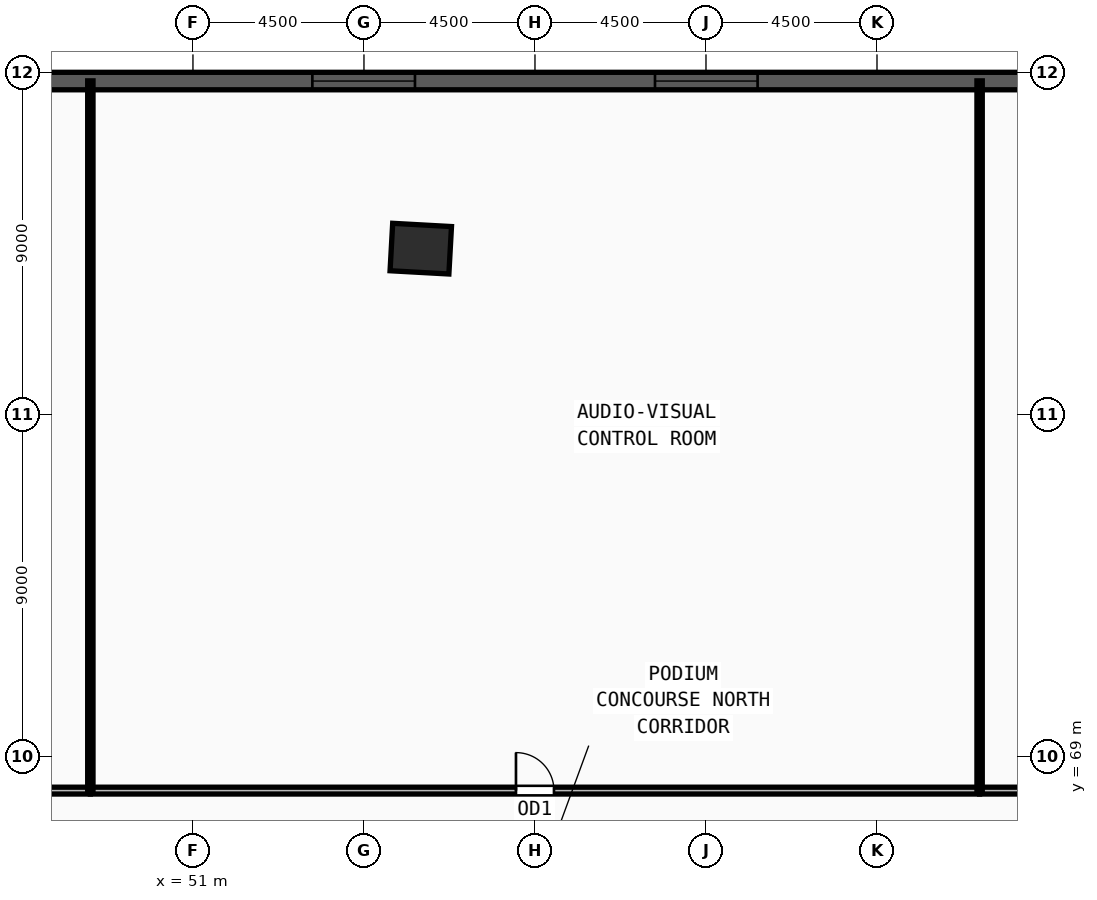
"""IFC4 building model, lengths in metres.
Left out: names, types, materials, properties, quantities, classifications, styles, units other than length and angle.
Written with IfcOpenShell. Run it as: python <this file> out.ifc"""

import sys

from ifc_helpers import new_model, si_unit, direction, frame, frame_2d, origin, origin_2d, place, context, subcontext, project, spatial, rectangle, extrude, source, transform, mapped, element, fill, save


model = new_model("IFC4")
c1 = context("Model", 3, precision=1e-05, world=origin(), true_north=direction((0.0, 1.0)))
c2 = subcontext(c1, "Body", "Model", "MODEL_VIEW")
j1 = project(units=[si_unit("LENGTHUNIT", "METRE"), si_unit("PLANEANGLEUNIT", "RADIAN")], contexts=[c1])
p1 = place(None, origin())
s1 = spatial("IfcSite", under=j1, at=p1, CompositionType="ELEMENT")
p2 = place(p1, origin())
s2 = spatial("IfcBuilding", under=s1, at=p2, CompositionType="ELEMENT")
p3 = place(p2, frame((0.0, 0.0, 9.9)))
s3 = spatial("IfcBuildingStorey", under=s2, at=p3, CompositionType="ELEMENT", Elevation=9.9)
m1 = source(origin(), c2, "Body", "SweptSolid", [
    extrude(rectangle(XDim=1.55, YDim=1.25, at=origin_2d()), origin(), (0.0, 0.0, 1.0), 4.5),
])
p4 = place(p3, frame((56.995, 82.36, 0.0), z_axis=(0.0, 0.0, 1.0), x_axis=(-0.998479491627, 0.055124448298, 0.0)))
e1 = element("IfcColumn", 1, at=p4, inside=s3, PredefinedType="COLUMN", context=c2, shape_type="MappedRepresentation", body=[
    mapped(m1, transform((0.0, 0.0, 0.0), x_axis=(1.0, 0.0, 0.0), y_axis=(0.0, 1.0, 0.0), z_axis=(0.0, 0.0, 1.0), scale=1.0)),
])
p5 = place(p3, frame((100.57, 86.77, 0.0), z_axis=(0.0, 0.0, 1.0), x_axis=(-1.0, 0.0, 0.0)))
e2 = element("IfcWall", 2, at=p5, inside=s3, PredefinedType="SOLIDWALL", context=c2, shape_type="SweptSolid", body=[
    extrude(rectangle(XDim=81.14, YDim=0.46, at=frame_2d((40.57, 0.0))), origin(), (0.0, 0.0, 1.0), 4.25),
])
m2 = source(origin(), c2, "Body", "SweptSolid", [
    extrude(rectangle(XDim=2.7, YDim=2.35, at=frame_2d((1.35, 1.175))), frame((0.0, 0.24, 0.0), z_axis=(0.0, -1.0, 0.0), x_axis=(1.0, 0.0, 0.0)), (0.0, 0.0, 1.0), 0.48),
])
p6 = place(p5, frame((7.666, 0.0, 0.55)))
e3 = element("IfcOpeningElement", 3, at=p6, cuts=e2, PredefinedType="OPENING", context=c2, shape_type="MappedRepresentation", body=[
    mapped(m2, transform((0.0, 0.0, 0.0), x_axis=(1.0, 0.0, 0.0), y_axis=(0.0, 1.0, 0.0), z_axis=(0.0, 0.0, 1.0), scale=1.0)),
])
p7 = place(p5, frame((16.681, 0.0, 0.55)))
e4 = element("IfcOpeningElement", 4, at=p7, cuts=e2, PredefinedType="OPENING", context=c2, shape_type="MappedRepresentation", body=[
    mapped(m2, transform((0.0, 0.0, 0.0), x_axis=(1.0, 0.0, 0.0), y_axis=(0.0, 1.0, 0.0), z_axis=(0.0, 0.0, 1.0), scale=1.0)),
])
p8 = place(p5, frame((34.712, 0.0, 0.55)))
e5 = element("IfcOpeningElement", 5, at=p8, cuts=e2, PredefinedType="OPENING", context=c2, shape_type="MappedRepresentation", body=[
    mapped(m2, transform((0.0, 0.0, 0.0), x_axis=(1.0, 0.0, 0.0), y_axis=(0.0, 1.0, 0.0), z_axis=(0.0, 0.0, 1.0), scale=1.0)),
])
p9 = place(p5, frame((43.728, 0.0, 0.55)))
e6 = element("IfcOpeningElement", 6, at=p9, cuts=e2, PredefinedType="OPENING", context=c2, shape_type="MappedRepresentation", body=[
    mapped(m2, transform((0.0, 0.0, 0.0), x_axis=(1.0, 0.0, 0.0), y_axis=(0.0, 1.0, 0.0), z_axis=(0.0, 0.0, 1.0), scale=1.0)),
])
p10 = place(p5, frame((61.759, 0.0, 0.55)))
e7 = element("IfcOpeningElement", 7, at=p10, cuts=e2, PredefinedType="OPENING", context=c2, shape_type="MappedRepresentation", body=[
    mapped(m2, transform((0.0, 0.0, 0.0), x_axis=(1.0, 0.0, 0.0), y_axis=(0.0, 1.0, 0.0), z_axis=(0.0, 0.0, 1.0), scale=1.0)),
])
p11 = place(p5, frame((70.774, 0.0, 0.55)))
e8 = element("IfcOpeningElement", 8, at=p11, cuts=e2, PredefinedType="OPENING", context=c2, shape_type="MappedRepresentation", body=[
    mapped(m2, transform((0.0, 0.0, 0.0), x_axis=(1.0, 0.0, 0.0), y_axis=(0.0, 1.0, 0.0), z_axis=(0.0, 0.0, 1.0), scale=1.0)),
])
p12 = place(p3, frame((48.3, 68.1, 0.0), z_axis=(0.0, 0.0, 1.0), x_axis=(1.0, 0.0, 0.0)))
e9 = element("IfcWall", 9, at=p12, inside=s3, PredefinedType="PARTITIONING", context=c2, shape_type="SweptSolid", body=[
    extrude(rectangle(XDim=23.4, YDim=0.18, at=frame_2d((11.7, 0.0))), origin(), (0.0, 0.0, 1.0), 4.25),
])
m3 = source(origin(), c2, "Body", "SweptSolid", [
    extrude(rectangle(XDim=1.0, YDim=2.2, at=frame_2d((0.5, 1.1))), frame((0.0, 0.1, 0.0), z_axis=(0.0, -1.0, 0.0), x_axis=(1.0, 0.0, 0.0)), (0.0, 0.0, 1.0), 0.2),
])
p13 = place(p12, frame((11.2, 0.0, 0.0)))
e10 = element("IfcOpeningElement", 10, at=p13, cuts=e9, PredefinedType="OPENING", context=c2, shape_type="MappedRepresentation", body=[
    mapped(m3, transform((0.0, 0.0, 0.0), x_axis=(1.0, 0.0, 0.0), y_axis=(0.0, 1.0, 0.0), z_axis=(0.0, 0.0, 1.0), scale=1.0)),
])
for number, where, z_axis, x_axis in (
    (11, (44.42, 68.1, 0.0), (0.0, 0.0, 1.0), (1.0, 0.0, 0.0)),
    (12, (71.7, 68.1, 0.0), (0.0, 0.0, 1.0), (1.0, 0.0, 0.0)),
):
    element("IfcWall", number, at=place(p3, frame(where, z_axis=z_axis, x_axis=x_axis)), inside=s3, PredefinedType="PARTITIONING", context=c2, shape_type="SweptSolid", body=[
        extrude(rectangle(XDim=3.88, YDim=0.18, at=frame_2d((1.94, 0.0))), origin(), (0.0, 0.0, 1.0), 4.25),
    ])
for number, where, z_axis, x_axis in (
    (13, (48.3, 68.1, 0.0), (0.0, 0.0, 1.0), (0.0, 1.0, 0.0)),
    (14, (71.7, 68.1, 0.0), (0.0, 0.0, 1.0), (0.0, 1.0, 0.0)),
):
    element("IfcWall", number, at=place(p3, frame(where, z_axis=z_axis, x_axis=x_axis)), inside=s3, PredefinedType="PARTITIONING", context=c2, shape_type="SweptSolid", body=[
        extrude(rectangle(XDim=18.675, YDim=0.14, at=frame_2d((9.337, 0.0))), origin(), (0.0, 0.0, 1.0), 4.25),
    ])
m4 = source(origin(), c2, "Body", "SweptSolid", [
    extrude(rectangle(XDim=2.7, YDim=2.35, at=frame_2d((1.35, 1.175))), frame((0.0, 0.03, 0.0), z_axis=(0.0, -1.0, 0.0), x_axis=(1.0, 0.0, 0.0)), (0.0, 0.0, 1.0), 0.06),
])
p14 = place(p8, origin())
e15 = element("IfcWindow", 15, at=p14, inside=s3, PartitioningType="TRIPLE_PANEL_VERTICAL", PredefinedType="WINDOW", context=c2, shape_type="MappedRepresentation", body=[
    mapped(m4, transform((0.0, 0.0, 0.0), x_axis=(1.0, 0.0, 0.0), y_axis=(0.0, 1.0, 0.0), z_axis=(0.0, 0.0, 1.0), scale=1.0)),
])
fill(e5, e15)
p15 = place(p9, origin())
e16 = element("IfcWindow", 16, at=p15, inside=s3, PartitioningType="TRIPLE_PANEL_VERTICAL", PredefinedType="WINDOW", context=c2, shape_type="MappedRepresentation", body=[
    mapped(m4, transform((0.0, 0.0, 0.0), x_axis=(1.0, 0.0, 0.0), y_axis=(0.0, 1.0, 0.0), z_axis=(0.0, 0.0, 1.0), scale=1.0)),
])
fill(e6, e16)
m5 = source(origin(), c2, "Body", "SweptSolid", [
    extrude(rectangle(XDim=1.0, YDim=2.2, at=frame_2d((0.5, 1.1))), frame((0.0, 0.025, 0.0), z_axis=(0.0, -1.0, 0.0), x_axis=(1.0, 0.0, 0.0)), (0.0, 0.0, 1.0), 0.05),
])
p16 = place(p13, origin())
e17 = element("IfcDoor", 17, at=p16, inside=s3, OperationType="SINGLE_SWING_LEFT", PredefinedType="DOOR", context=c2, shape_type="MappedRepresentation", body=[
    mapped(m5, transform((0.0, 0.0, 0.0), x_axis=(1.0, 0.0, 0.0), y_axis=(0.0, 1.0, 0.0), z_axis=(0.0, 0.0, 1.0), scale=1.0)),
])
fill(e10, e17)
save(model, sys.argv[1])
